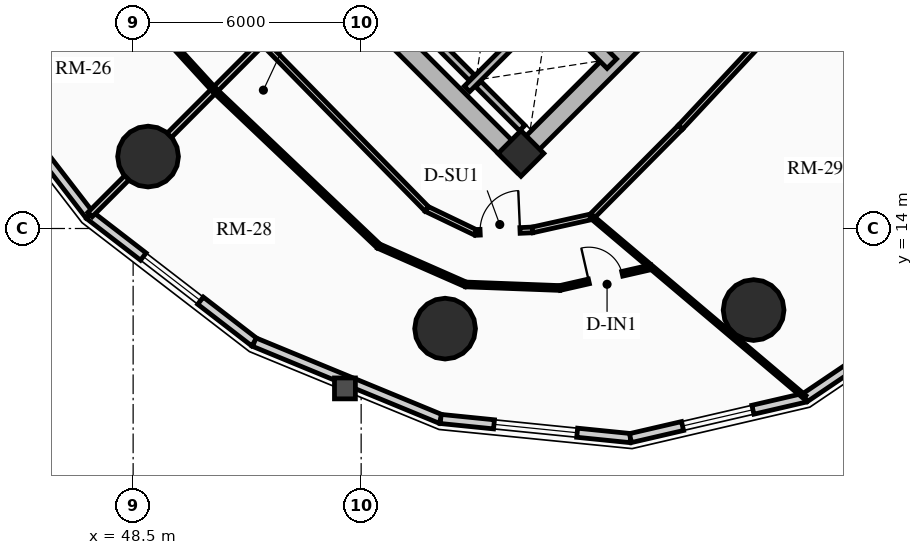
"""IFC4 building model, lengths in metres.
Left out: names, types, materials, properties, quantities, classifications, styles, units other than length and angle.
Written with IfcOpenShell. Run it as: python <this file> out.ifc"""

import sys

from ifc_helpers import new_model, si_unit, direction, frame, frame_2d, origin, origin_2d, place, context, subcontext, project, spatial, rectangle, circle, extrude, source, transform, mapped, element, fill, save


model = new_model("IFC4")
c1 = context("Model", 3, precision=1e-05, world=origin(), true_north=direction((0.0, 1.0)))
c2 = subcontext(c1, "Body", "Model", "MODEL_VIEW")
j1 = project(units=[si_unit("LENGTHUNIT", "METRE"), si_unit("PLANEANGLEUNIT", "RADIAN")], contexts=[c1])
p1 = place(None, origin())
s1 = spatial("IfcSite", under=j1, at=p1, CompositionType="ELEMENT")
p2 = place(p1, origin())
s2 = spatial("IfcBuilding", under=s1, at=p2, CompositionType="ELEMENT")
p3 = place(p2, frame((0.0, 0.0, 24.91)))
s3 = spatial("IfcBuildingStorey", under=s2, at=p3, CompositionType="ELEMENT", Elevation=24.91)
p4 = place(p3, frame((58.773, 15.661, 0.0), z_axis=(0.0, 0.0, 1.0), x_axis=(-0.707106781187, 0.707106781187, 0.0)))
e1 = element("IfcWall", 1, at=p4, inside=s3, PredefinedType="SHEAR", context=c2, shape_type="SweptSolid", body=[
    extrude(rectangle(XDim=14.3, YDim=0.5, at=frame_2d((7.15, 0.0))), origin(), (0.0, 0.0, 1.0), 2.91),
])
p5 = place(p3, frame((58.596, 15.838, 0.0), z_axis=(0.0, 0.0, 1.0), x_axis=(0.707106781187, 0.707106781187, 0.0)))
e2 = element("IfcWall", 2, at=p5, inside=s3, PredefinedType="SHEAR", context=c2, shape_type="SweptSolid", body=[
    extrude(rectangle(XDim=10.7, YDim=0.5, at=frame_2d((5.35, 0.0))), origin(), (0.0, 0.0, 1.0), 2.91),
])
m1 = source(origin(), c2, "Body", "SweptSolid", [
    extrude(rectangle(XDim=1.5, YDim=2.02, at=frame_2d((0.75, 1.01))), frame((0.0, 0.26, 0.0), z_axis=(0.0, -1.0, 0.0), x_axis=(1.0, 0.0, 0.0)), (0.0, 0.0, 1.0), 0.52),
])
p6 = place(p5, frame((5.45, 0.0, 0.0)))
e3 = element("IfcOpeningElement", 3, at=p6, cuts=e2, PredefinedType="OPENING", context=c2, shape_type="MappedRepresentation", body=[
    mapped(m1, transform((0.0, 0.0, 0.0), x_axis=(1.0, 0.0, 0.0), y_axis=(0.0, 1.0, 0.0), z_axis=(0.0, 0.0, 1.0), scale=1.0)),
])
p7 = place(p3, frame((61.096, 18.338, 0.0), z_axis=(0.0, 0.0, 1.0), x_axis=(-0.707106781187, 0.707106781187, 0.0)))
e4 = element("IfcWall", 4, at=p7, inside=s3, PredefinedType="SHEAR", context=c2, shape_type="SweptSolid", body=[
    extrude(rectangle(XDim=13.8, YDim=0.35, at=frame_2d((6.9, 0.0))), origin(), (0.0, 0.0, 1.0), 2.91),
])
m2 = source(origin(), c2, "Body", "SweptSolid", [
    extrude(rectangle(XDim=1.1, YDim=2.015, at=frame_2d((0.55, 1.007))), frame((0.0, 0.185, 0.0), z_axis=(0.0, -1.0, 0.0), x_axis=(1.0, 0.0, 0.0)), (0.0, 0.0, 1.0), 0.37),
])
p8 = place(p7, frame((4.9, 0.0, 0.0)))
e5 = element("IfcOpeningElement", 5, at=p8, cuts=e4, PredefinedType="OPENING", context=c2, shape_type="MappedRepresentation", body=[
    mapped(m2, transform((0.0, 0.0, 0.0), x_axis=(1.0, 0.0, 0.0), y_axis=(0.0, 1.0, 0.0), z_axis=(0.0, 0.0, 1.0), scale=1.0)),
])
m3 = source(origin(), c2, "Body", "SweptSolid", [
    extrude(rectangle(XDim=1.15, YDim=2.02, at=frame_2d((0.575, 1.01))), frame((0.0, 0.185, 0.0), z_axis=(0.0, -1.0, 0.0), x_axis=(1.0, 0.0, 0.0)), (0.0, 0.0, 1.0), 0.37),
])
p9 = place(p7, frame((7.32, 0.0, 0.0)))
e6 = element("IfcOpeningElement", 6, at=p9, cuts=e4, PredefinedType="OPENING", context=c2, shape_type="MappedRepresentation", body=[
    mapped(m3, transform((0.0, 0.0, 0.0), x_axis=(1.0, 0.0, 0.0), y_axis=(0.0, 1.0, 0.0), z_axis=(0.0, 0.0, 1.0), scale=1.0)),
])
p10 = place(p3, frame((58.706, 15.976, 0.0), z_axis=(0.0, 0.0, 1.0), x_axis=(0.707106781187, 0.707106781187, 0.0)))
e7 = element("IfcColumn", 7, at=p10, inside=s3, PredefinedType="COLUMN", context=c2, shape_type="SweptSolid", body=[
    extrude(rectangle(XDim=0.85, YDim=0.85, at=origin_2d()), origin(), (0.0, 0.0, 1.0), 2.91),
])
for number, where, z_axis, x_axis in (
    (8, (48.893, 15.893, 0.0), (0.0, 0.0, 1.0), (1.0, 0.0, 0.0)),
    (9, (56.709, 11.365, 0.0), (0.0, 0.0, 1.0), (1.0, 0.0, 0.0)),
    (10, (64.827, 11.854, 0.0), (0.0, 0.0, 1.0), (1.0, 0.0, 0.0)),
):
    element("IfcColumn", number, at=place(p3, frame(where, z_axis=z_axis, x_axis=x_axis)), inside=s3, PredefinedType="USERDEFINED", context=c2, shape_type="SweptSolid", body=[
        extrude(circle(Radius=0.8, at=origin_2d()), origin(), (0.0, 0.0, 1.0), 2.91),
    ])
p11 = place(p3, frame((47.352, 14.352, 0.0), z_axis=(0.0, 0.0, 1.0), x_axis=(-0.610557396243, 0.791972010801, 0.0)))
e11 = element("IfcWall", 11, at=p11, inside=s3, PredefinedType="SOLIDWALL", context=c2, shape_type="SweptSolid", body=[
    extrude(rectangle(XDim=5.475, YDim=0.24, at=frame_2d((2.737, 0.0))), origin(), (0.0, 0.0, 1.0), 2.073),
])
p12 = place(p3, frame((51.688, 11.01, 0.0), z_axis=(0.0, 0.0, 1.0), x_axis=(-0.791972010801, 0.610557396243, 0.0)))
e12 = element("IfcWall", 12, at=p12, inside=s3, PredefinedType="SOLIDWALL", context=c2, shape_type="SweptSolid", body=[
    extrude(rectangle(XDim=5.475, YDim=0.24, at=frame_2d((2.737, 0.0))), origin(), (0.0, 0.0, 1.0), 2.073),
])
m4 = source(origin(), c2, "Body", "SweptSolid", [
    extrude(rectangle(XDim=1.9, YDim=1.35, at=frame_2d((0.95, 0.675))), frame((0.0, 0.13, 0.0), z_axis=(0.0, -1.0, 0.0), x_axis=(1.0, 0.0, 0.0)), (0.0, 0.0, 1.0), 0.26),
])
p13 = place(p12, frame((1.787, 0.0, 0.65)))
e13 = element("IfcOpeningElement", 13, at=p13, cuts=e12, PredefinedType="OPENING", context=c2, shape_type="MappedRepresentation", body=[
    mapped(m4, transform((0.0, 0.0, 0.0), x_axis=(1.0, 0.0, 0.0), y_axis=(0.0, 1.0, 0.0), z_axis=(0.0, 0.0, 1.0), scale=1.0)),
])
p14 = place(p3, frame((56.593, 8.988, 0.0), z_axis=(0.0, 0.0, 1.0), x_axis=(-0.924528403616, 0.381113147118, 0.0)))
e14 = element("IfcWall", 14, at=p14, inside=s3, PredefinedType="SOLIDWALL", context=c2, shape_type="SweptSolid", body=[
    extrude(rectangle(XDim=5.305, YDim=0.24, at=frame_2d((2.653, 0.0))), origin(), (0.0, 0.0, 1.0), 2.073),
])
p15 = place(p3, frame((61.586, 8.484, 0.0), z_axis=(0.0, 0.0, 1.0), x_axis=(-0.994951574538, 0.100356187272, 0.0)))
e15 = element("IfcWall", 15, at=p15, inside=s3, PredefinedType="SOLIDWALL", context=c2, shape_type="SweptSolid", body=[
    extrude(rectangle(XDim=5.019, YDim=0.24, at=frame_2d((2.509, 0.0))), origin(), (0.0, 0.0, 1.0), 2.073),
])
m5 = source(origin(), c2, "Body", "SweptSolid", [
    extrude(rectangle(XDim=2.2, YDim=1.35, at=frame_2d((1.1, 0.675))), frame((0.0, 0.13, 0.0), z_axis=(0.0, -1.0, 0.0), x_axis=(1.0, 0.0, 0.0)), (0.0, 0.0, 1.0), 0.26),
])
p16 = place(p15, frame((1.409, 0.0, 0.65)))
e16 = element("IfcOpeningElement", 16, at=p16, cuts=e15, PredefinedType="OPENING", context=c2, shape_type="MappedRepresentation", body=[
    mapped(m5, transform((0.0, 0.0, 0.0), x_axis=(1.0, 0.0, 0.0), y_axis=(0.0, 1.0, 0.0), z_axis=(0.0, 0.0, 1.0), scale=1.0)),
])
p17 = place(p3, frame((66.18, 9.548, 0.0), z_axis=(0.0, 0.0, 1.0), x_axis=(-0.974197104074, -0.225698919833, 0.0)))
e17 = element("IfcWall", 17, at=p17, inside=s3, PredefinedType="SOLIDWALL", context=c2, shape_type="SweptSolid", body=[
    extrude(rectangle(XDim=4.715, YDim=0.24, at=frame_2d((2.357, 0.0))), origin(), (0.0, 0.0, 1.0), 2.073),
])
p18 = place(p17, frame((1.408, 0.0, 0.65)))
e18 = element("IfcOpeningElement", 18, at=p18, cuts=e17, PredefinedType="OPENING", context=c2, shape_type="MappedRepresentation", body=[
    mapped(m4, transform((0.0, 0.0, 0.0), x_axis=(1.0, 0.0, 0.0), y_axis=(0.0, 1.0, 0.0), z_axis=(0.0, 0.0, 1.0), scale=1.0)),
])
p19 = place(p3, frame((69.924, 12.076, 0.0), z_axis=(0.0, 0.0, 1.0), x_axis=(-0.828776615238, -0.559579594012, 0.0)))
e19 = element("IfcWall", 19, at=p19, inside=s3, PredefinedType="SOLIDWALL", context=c2, shape_type="SweptSolid", body=[
    extrude(rectangle(XDim=4.517, YDim=0.24, at=frame_2d((2.259, 0.0))), origin(), (0.0, 0.0, 1.0), 2.073),
])
p20 = place(p3, frame((57.284, 17.673, 0.0), z_axis=(0.0, 0.0, 1.0), x_axis=(0.707147878904, 0.70706568108, 0.0)))
e20 = element("IfcWall", 20, at=p20, inside=s3, PredefinedType="SHEAR", context=c2, shape_type="SweptSolid", body=[
    extrude(rectangle(XDim=2.97, YDim=0.2, at=frame_2d((1.485, 0.0))), origin(), (0.0, 0.0, 1.0), 2.91),
])
p21 = place(p3, frame((57.412, 17.97, 0.0), z_axis=(0.0, 0.0, 1.0), x_axis=(-0.707106781187, 0.707106781187, 0.0)))
e21 = element("IfcWall", 21, at=p21, inside=s3, PredefinedType="SHEAR", context=c2, shape_type="SweptSolid", body=[
    extrude(rectangle(XDim=1.735, YDim=0.2, at=frame_2d((0.867, 0.0))), origin(), (0.0, 0.0, 1.0), 2.91),
])
p22 = place(p3, frame((58.737, 16.644, 0.0), z_axis=(0.0, 0.0, 1.0), x_axis=(-0.707032117043, 0.707181437447, 0.0)))
e22 = element("IfcWall", 22, at=p22, inside=s3, PredefinedType="SHEAR", context=c2, shape_type="SweptSolid", body=[
    extrude(rectangle(XDim=1.635, YDim=0.2, at=frame_2d((0.817, 0.0))), origin(), (0.0, 0.0, 1.0), 2.91),
])
p23 = place(p3, frame((51.914, 18.914, 0.0), z_axis=(0.0, 0.0, 1.0), x_axis=(0.699999313799, -0.714143515465, 0.0)))
e23 = element("IfcWall", 23, at=p23, inside=s3, PredefinedType="PARTITIONING", context=c2, shape_type="SweptSolid", body=[
    extrude(rectangle(XDim=6.162, YDim=0.15, at=frame_2d((3.081, 0.0))), origin(), (0.0, 0.0, 1.0), 2.159),
])
p24 = place(p3, frame((56.227, 14.513, 0.0), z_axis=(0.0, 0.0, 1.0), x_axis=(0.901477579283, -0.432825801044, 0.0)))
e24 = element("IfcWall", 24, at=p24, inside=s3, PredefinedType="PARTITIONING", context=c2, shape_type="SweptSolid", body=[
    extrude(rectangle(XDim=1.424, YDim=0.15, at=frame_2d((0.712, 0.0))), origin(), (0.0, 0.0, 1.0), 2.205),
])
p25 = place(p3, frame((57.511, 13.897, 0.0), z_axis=(0.0, 0.0, 1.0), x_axis=(0.999024538494, 0.044158481476, 0.0)))
e25 = element("IfcWall", 25, at=p25, inside=s3, PredefinedType="PARTITIONING", context=c2, shape_type="SweptSolid", body=[
    extrude(rectangle(XDim=1.498, YDim=0.15, at=frame_2d((0.749, 0.0))), origin(), (0.0, 0.0, 1.0), 2.159),
])
m6 = source(origin(), c2, "Body", "SweptSolid", [
    extrude(rectangle(XDim=1.05, YDim=2.015, at=frame_2d((0.525, 1.007))), frame((0.0, 0.085, 0.0), z_axis=(0.0, -1.0, 0.0), x_axis=(1.0, 0.0, 0.0)), (0.0, 0.0, 1.0), 0.17),
])
p26 = place(p25, frame((0.12, 0.0, 0.0)))
e26 = element("IfcOpeningElement", 26, at=p26, cuts=e25, PredefinedType="OPENING", context=c2, shape_type="MappedRepresentation", body=[
    mapped(m6, transform((0.0, 0.0, 0.0), x_axis=(1.0, 0.0, 0.0), y_axis=(0.0, 1.0, 0.0), z_axis=(0.0, 0.0, 1.0), scale=1.0)),
])
p27 = place(p3, frame((59.008, 13.963, 0.0), z_axis=(0.0, 0.0, 1.0), x_axis=(0.976020856791, 0.21767702476, 0.0)))
e27 = element("IfcWall", 27, at=p27, inside=s3, PredefinedType="PARTITIONING", context=c2, shape_type="SweptSolid", body=[
    extrude(rectangle(XDim=1.593, YDim=0.15, at=frame_2d((0.796, 0.0))), origin(), (0.0, 0.0, 1.0), 2.205),
])
p28 = place(p3, frame((60.562, 14.31, 0.0), z_axis=(0.0, 0.0, 1.0), x_axis=(0.704566236161, 0.709638230975, 0.0)))
e28 = element("IfcWall", 28, at=p28, inside=s3, PredefinedType="PARTITIONING", context=c2, shape_type="SweptSolid", body=[
    extrude(rectangle(XDim=3.321, YDim=0.15, at=frame_2d((1.661, 0.0))), origin(), (0.0, 0.0, 1.0), 2.159),
])
p29 = place(p3, frame((62.903, 16.667, 0.0), z_axis=(0.0, 0.0, 1.0), x_axis=(0.682371947497, 0.731005147225, 0.0)))
e29 = element("IfcWall", 29, at=p29, inside=s3, PredefinedType="PARTITIONING", context=c2, shape_type="SweptSolid", body=[
    extrude(rectangle(XDim=6.642, YDim=0.15, at=frame_2d((3.321, 0.0))), origin(), (0.0, 0.0, 1.0), 2.159),
])
p30 = place(p3, frame((51.914, 18.914, 0.0), z_axis=(0.0, 0.0, 1.0), x_axis=(-0.707106781187, -0.707106781187, 0.0)))
e30 = element("IfcWall", 30, at=p30, inside=s3, PredefinedType="PARTITIONING", context=c2, shape_type="SweptSolid", body=[
    extrude(rectangle(XDim=6.431, YDim=0.16, at=frame_2d((3.215, 0.0))), origin(), (0.0, 0.0, 1.0), 2.073),
])
p31 = place(p3, frame((60.562, 14.31, 0.0), z_axis=(0.0, 0.0, 1.0), x_axis=(0.763547638675, -0.645751502881, 0.0)))
e31 = element("IfcWall", 31, at=p31, inside=s3, PredefinedType="MOVABLE", context=c2, shape_type="SweptSolid", body=[
    extrude(rectangle(XDim=7.345, YDim=0.1, at=frame_2d((3.673, 0.0))), origin(), (0.0, 0.0, 1.0), 2.073),
])
p32 = place(p3, frame((46.676, 21.978, 0.0), z_axis=(0.0, 0.0, 1.0), x_axis=(0.67473816271, -0.738057187339, 0.0)))
e32 = element("IfcWall", 32, at=p32, inside=s3, PredefinedType="PARTITIONING", context=c2, shape_type="SweptSolid", body=[
    extrude(rectangle(XDim=5.876, YDim=0.125, at=frame_2d((2.938, 0.0))), origin(), (0.0, 0.0, 1.0), 2.635),
])
p33 = place(p3, frame((50.641, 17.641, 0.0), z_axis=(0.0, 0.0, 1.0), x_axis=(0.724909383019, -0.688844239586, 0.0)))
e33 = element("IfcWall", 33, at=p33, inside=s3, PredefinedType="PARTITIONING", context=c2, shape_type="SweptSolid", body=[
    extrude(rectangle(XDim=5.957, YDim=0.125, at=frame_2d((2.979, 0.0))), origin(), (0.0, 0.0, 1.0), 2.159),
])
p34 = place(p3, frame((54.959, 13.537, 0.0), z_axis=(0.0, 0.0, 1.0), x_axis=(0.915414044123, -0.402513512596, 0.0)))
e34 = element("IfcWall", 34, at=p34, inside=s3, PredefinedType="PARTITIONING", context=c2, shape_type="SweptSolid", body=[
    extrude(rectangle(XDim=2.508, YDim=0.125, at=frame_2d((1.254, 0.0))), origin(), (0.0, 0.0, 1.0), 2.159),
])
p35 = place(p3, frame((57.255, 12.528, 0.0), z_axis=(0.0, 0.0, 1.0), x_axis=(0.999290303909, -0.037668136579, 0.0)))
e35 = element("IfcWall", 35, at=p35, inside=s3, PredefinedType="PARTITIONING", context=c2, shape_type="SweptSolid", body=[
    extrude(rectangle(XDim=2.476, YDim=0.125, at=frame_2d((1.238, 0.0))), origin(), (0.0, 0.0, 1.0), 2.159),
])
p36 = place(p3, frame((59.729, 12.434, 0.0), z_axis=(0.0, 0.0, 1.0), x_axis=(0.975062765266, 0.221929276555, 0.0)))
e36 = element("IfcWall", 36, at=p36, inside=s3, PredefinedType="PARTITIONING", context=c2, shape_type="SweptSolid", body=[
    extrude(rectangle(XDim=2.465, YDim=0.125, at=frame_2d((1.233, 0.0))), origin(), (0.0, 0.0, 1.0), 2.205),
])
m7 = source(origin(), c2, "Body", "SweptSolid", [
    extrude(rectangle(XDim=0.9, YDim=2.005, at=frame_2d((0.45, 1.002))), frame((0.0, 0.073, 0.0), z_axis=(0.0, -1.0, 0.0), x_axis=(1.0, 0.0, 0.0)), (0.0, 0.0, 1.0), 0.145),
])
p37 = place(p36, frame((0.783, 0.0, 0.0)))
e37 = element("IfcOpeningElement", 37, at=p37, cuts=e36, PredefinedType="OPENING", context=c2, shape_type="MappedRepresentation", body=[
    mapped(m7, transform((0.0, 0.0, 0.0), x_axis=(1.0, 0.0, 0.0), y_axis=(0.0, 1.0, 0.0), z_axis=(0.0, 0.0, 1.0), scale=1.0)),
])
m8 = source(origin(), c2, "Body", "SweptSolid", [
    extrude(rectangle(XDim=1.9, YDim=1.35, at=frame_2d((0.95, 0.675))), frame((0.0, 0.03, 0.0), z_axis=(0.0, -1.0, 0.0), x_axis=(1.0, 0.0, 0.0)), (0.0, 0.0, 1.0), 0.06),
])
p38 = place(p13, origin())
e38 = element("IfcWindow", 38, at=p38, inside=s3, PartitioningType="DOUBLE_PANEL_VERTICAL", PredefinedType="WINDOW", context=c2, shape_type="MappedRepresentation", body=[
    mapped(m8, transform((0.0, 0.0, 0.0), x_axis=(1.0, 0.0, 0.0), y_axis=(0.0, 1.0, 0.0), z_axis=(0.0, 0.0, 1.0), scale=1.0)),
])
fill(e13, e38)
m9 = source(origin(), c2, "Body", "SweptSolid", [
    extrude(rectangle(XDim=2.2, YDim=1.35, at=frame_2d((1.1, 0.675))), frame((0.0, 0.03, 0.0), z_axis=(0.0, -1.0, 0.0), x_axis=(1.0, 0.0, 0.0)), (0.0, 0.0, 1.0), 0.06),
])
p39 = place(p16, origin())
e39 = element("IfcWindow", 39, at=p39, inside=s3, PartitioningType="DOUBLE_PANEL_VERTICAL", PredefinedType="WINDOW", context=c2, shape_type="MappedRepresentation", body=[
    mapped(m9, transform((0.0, 0.0, 0.0), x_axis=(1.0, 0.0, 0.0), y_axis=(0.0, 1.0, 0.0), z_axis=(0.0, 0.0, 1.0), scale=1.0)),
])
fill(e16, e39)
p40 = place(p18, origin())
e40 = element("IfcWindow", 40, at=p40, inside=s3, PartitioningType="DOUBLE_PANEL_VERTICAL", PredefinedType="WINDOW", context=c2, shape_type="MappedRepresentation", body=[
    mapped(m8, transform((0.0, 0.0, 0.0), x_axis=(1.0, 0.0, 0.0), y_axis=(0.0, 1.0, 0.0), z_axis=(0.0, 0.0, 1.0), scale=1.0)),
])
fill(e18, e40)
m10 = source(origin(), c2, "Body", "SweptSolid", [
    extrude(rectangle(XDim=1.05, YDim=2.015, at=frame_2d((0.525, 1.007))), frame((0.0, 0.025, 0.0), z_axis=(0.0, -1.0, 0.0), x_axis=(1.0, 0.0, 0.0)), (0.0, 0.0, 1.0), 0.05),
])
p41 = place(p26, origin())
e41 = element("IfcDoor", 41, at=p41, inside=s3, OperationType="SINGLE_SWING_RIGHT", PredefinedType="DOOR", context=c2, shape_type="MappedRepresentation", body=[
    mapped(m10, transform((0.0, 0.0, 0.0), x_axis=(1.0, 0.0, 0.0), y_axis=(0.0, 1.0, 0.0), z_axis=(0.0, 0.0, 1.0), scale=1.0)),
])
fill(e26, e41)
m11 = source(origin(), c2, "Body", "SweptSolid", [
    extrude(rectangle(XDim=0.9, YDim=2.005, at=frame_2d((0.45, 1.002))), frame((0.0, 0.025, 0.0), z_axis=(0.0, -1.0, 0.0), x_axis=(1.0, 0.0, 0.0)), (0.0, 0.0, 1.0), 0.05),
])
p42 = place(p37, origin())
e42 = element("IfcDoor", 42, at=p42, inside=s3, OperationType="SINGLE_SWING_LEFT", PredefinedType="DOOR", context=c2, shape_type="MappedRepresentation", body=[
    mapped(m11, transform((0.0, 0.0, 0.0), x_axis=(1.0, 0.0, 0.0), y_axis=(0.0, 1.0, 0.0), z_axis=(0.0, 0.0, 1.0), scale=1.0)),
])
fill(e37, e42)
save(model, sys.argv[1])
